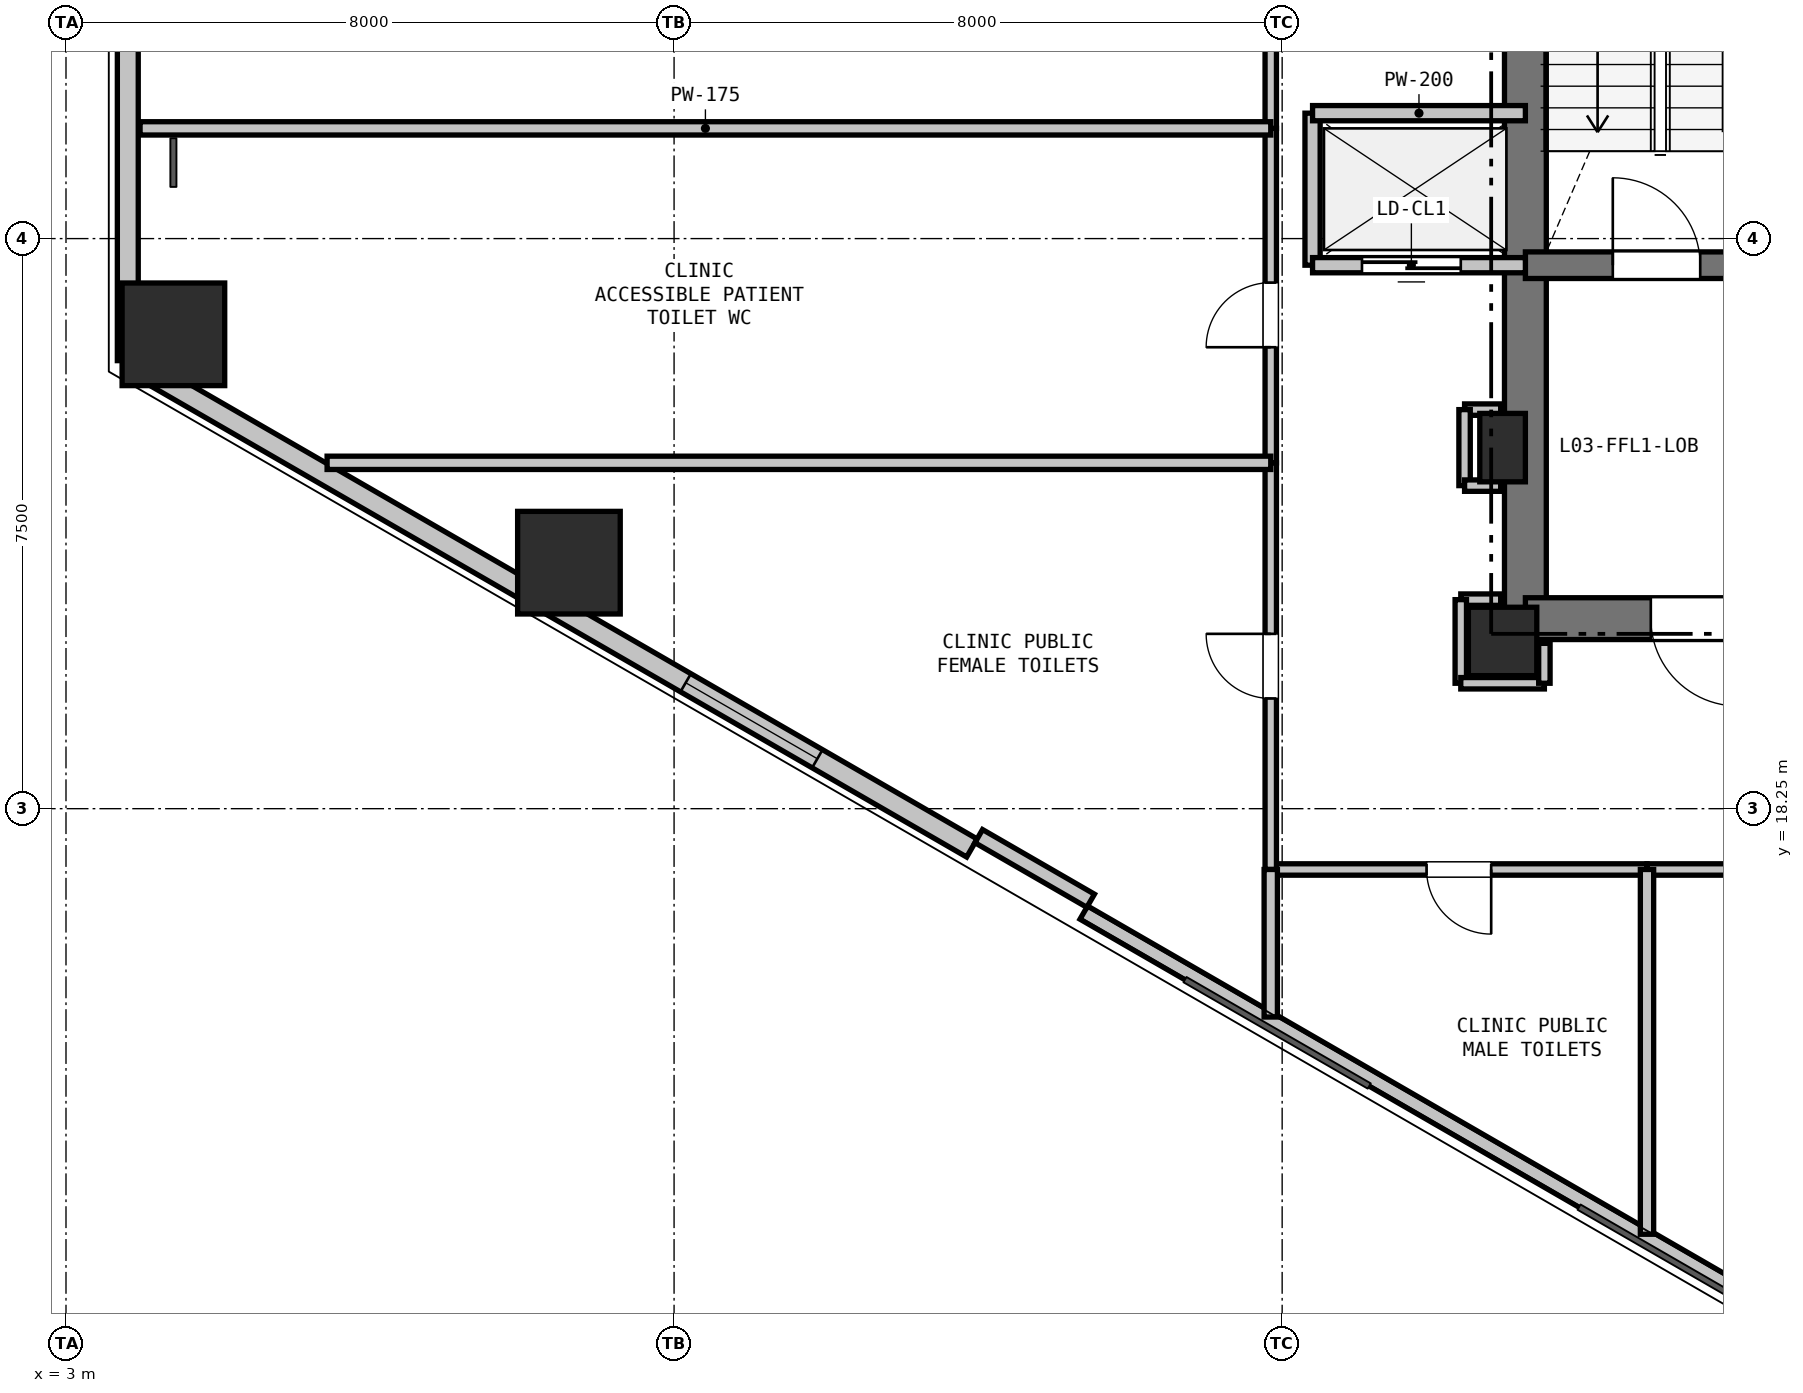
"""IFC4 building model, lengths in metres.
Left out: names, types, materials, properties, quantities, classifications, styles, units other than length and angle.
Written with IfcOpenShell. Run it as: python <this file> out.ifc"""

import sys

from ifc_helpers import new_model, si_unit, direction, frame, frame_2d, origin, origin_2d, place, context, subcontext, project, spatial, rectangle, hollow_rectangle, extrude, element, fill, save


model = new_model("IFC4")
c1 = context("Model", 3, precision=1e-05, world=origin(), true_north=direction((0.0, 1.0)))
c2 = subcontext(c1, "Body", "Model", "MODEL_VIEW")
j1 = project(units=[si_unit("LENGTHUNIT", "METRE"), si_unit("PLANEANGLEUNIT", "RADIAN")], contexts=[c1])
p1 = place(None, origin())
s1 = spatial("IfcSite", under=j1, at=p1, CompositionType="ELEMENT")
p2 = place(p1, origin())
s2 = spatial("IfcBuilding", under=s1, at=p2, CompositionType="ELEMENT")
p3 = place(p2, frame((0.0, 0.0, 14.4)))
s3 = spatial("IfcBuildingStorey", under=s2, at=p3, CompositionType="ELEMENT", Elevation=14.4)
p4 = place(p3, frame((21.9, 20.45, 0.0), z_axis=(0.0, 0.0, 1.0), x_axis=(1.0, 0.0, 0.0)))
e1 = element("IfcColumn", 1, at=p4, inside=s3, PredefinedType="COLUMN", context=c2, shape_type="SweptSolid", body=[
    extrude(rectangle(XDim=0.9, YDim=0.9, at=origin_2d()), origin(), (0.0, 0.0, 1.0), 4.8),
])
p5 = place(p3, frame((21.9, 23.0, 0.0), z_axis=(0.0, 0.0, 1.0), x_axis=(1.0, 0.0, 0.0)))
e2 = element("IfcColumn", 2, at=p5, inside=s3, PredefinedType="PILASTER", context=c2, shape_type="SweptSolid", body=[
    extrude(rectangle(XDim=0.6, YDim=0.9, at=origin_2d()), origin(), (0.0, 0.0, 1.0), 4.8),
])
for number, where, z_axis, x_axis in (
    (3, (9.617, 21.486, 0.0), (0.0, 0.0, 1.0), (1.0, 0.0, 0.0)),
    (4, (4.413, 24.491, 0.0), (0.0, 0.0, 1.0), (1.0, 0.0, 0.0)),
):
    element("IfcColumn", number, at=place(p3, frame(where, z_axis=z_axis, x_axis=x_axis)), inside=s3, PredefinedType="COLUMN", context=c2, shape_type="SweptSolid", body=[
        extrude(hollow_rectangle(XDim=1.35, YDim=1.35, WallThickness=0.036, at=origin_2d()), origin(), (0.0, 0.0, 1.0), 4.8),
    ])
p6 = place(p3, frame((3.813, 24.144, 0.0), z_axis=(0.0, 0.0, 1.0), x_axis=(0.0, 1.0, 0.0)))
e5 = element("IfcWall", 5, at=p6, inside=s3, PredefinedType="SOLIDWALL", context=c2, shape_type="SweptSolid", body=[
    extrude(rectangle(XDim=5.211, YDim=0.275, at=frame_2d((2.606, 0.0))), origin(), (0.0, 0.0, 1.0), 4.14),
])
p7 = place(p3, frame((26.76, 10.896, 0.0), z_axis=(0.0, 0.0, 1.0), x_axis=(-0.866027351828, 0.499996625875, 0.0)))
e6 = element("IfcWall", 6, at=p7, inside=s3, PredefinedType="PARAPET", context=c2, shape_type="SweptSolid", body=[
    extrude(rectangle(XDim=11.973, YDim=0.2, at=frame_2d((5.987, 0.0))), origin(), (0.0, 0.0, 1.0), 0.2),
])
p8 = place(p3, frame((14.918, 17.733, 0.0), z_axis=(0.0, 0.0, 1.0), x_axis=(-0.866027105532, 0.499997052475, 0.0)))
e7 = element("IfcWall", 7, at=p8, inside=s3, PredefinedType="SOLIDWALL", context=c2, shape_type="SweptSolid", body=[
    extrude(rectangle(XDim=12.673, YDim=0.275, at=frame_2d((6.336, 0.0))), origin(), (0.0, 0.0, 1.0), 4.14),
])
p9 = place(p8, frame((2.348, 0.0, 0.9)))
e8 = element("IfcOpeningElement", 8, at=p9, cuts=e7, PredefinedType="OPENING", context=c2, shape_type="SweptSolid", body=[
    extrude(rectangle(XDim=2.0, YDim=1.8, at=frame_2d((1.0, 0.9))), frame((0.0, 0.147, 0.0), z_axis=(0.0, -1.0, 0.0), x_axis=(1.0, 0.0, 0.0)), (0.0, 0.0, 1.0), 0.295),
])
p10 = place(p3, frame((16.48, 17.039, 0.0), z_axis=(0.0, 0.0, 1.0), x_axis=(-0.86605165483, 0.499954529098, 0.0)))
e9 = element("IfcWall", 9, at=p10, inside=s3, PredefinedType="PARAPET", context=c2, shape_type="SweptSolid", body=[
    extrude(rectangle(XDim=1.7, YDim=0.2, at=frame_2d((0.85, 0.0))), origin(), (0.0, 0.0, 1.0), 4.14),
])
p11 = place(p3, frame((22.2, 20.75, 0.0), z_axis=(0.0, 0.0, 1.0), x_axis=(0.0, 1.0, 0.0)))
e10 = element("IfcWall", 10, at=p11, inside=s3, PredefinedType="SHEAR", context=c2, shape_type="SweptSolid", body=[
    extrude(rectangle(XDim=4.65, YDim=0.55, at=frame_2d((2.325, 0.0))), origin(), (0.0, 0.0, 1.0), 4.52),
])
p12 = place(p3, frame((22.2, 25.4, 0.0), z_axis=(0.0, 0.0, 1.0), x_axis=(0.0, 1.0, 0.0)))
e11 = element("IfcWall", 11, at=p12, inside=s3, PredefinedType="SHEAR", context=c2, shape_type="SweptSolid", body=[
    extrude(rectangle(XDim=7.35, YDim=0.55, at=frame_2d((3.675, 0.0))), origin(), (0.0, 0.0, 1.0), 4.52),
])
p13 = place(p3, frame((25.65, 20.75, 0.0), z_axis=(0.0, 0.0, 1.0), x_axis=(-1.0, 0.0, 0.0)))
e12 = element("IfcWall", 12, at=p13, inside=s3, PredefinedType="SHEAR", context=c2, shape_type="SweptSolid", body=[
    extrude(rectangle(XDim=3.45, YDim=0.55, at=frame_2d((1.725, 0.0))), origin(), (0.0, 0.0, 1.0), 4.52),
])
p14 = place(p13, frame((0.65, 0.0, 0.0)))
e13 = element("IfcOpeningElement", 13, at=p14, cuts=e12, PredefinedType="OPENING", context=c2, shape_type="SweptSolid", body=[
    extrude(rectangle(XDim=1.15, YDim=2.15, at=frame_2d((0.575, 1.075))), frame((0.0, 0.285, 0.0), z_axis=(0.0, -1.0, 0.0), x_axis=(1.0, 0.0, 0.0)), (0.0, 0.0, 1.0), 0.57),
])
p15 = place(p3, frame((22.2, 25.4, 0.0), z_axis=(0.0, 0.0, 1.0), x_axis=(1.0, 0.0, 0.0)))
e14 = element("IfcWall", 14, at=p15, inside=s3, PredefinedType="SHEAR", context=c2, shape_type="SweptSolid", body=[
    extrude(rectangle(XDim=3.45, YDim=0.35, at=frame_2d((1.725, 0.0))), origin(), (0.0, 0.0, 1.0), 4.52),
])
p16 = place(p15, frame((1.15, 0.0, 0.0)))
e15 = element("IfcOpeningElement", 15, at=p16, cuts=e14, PredefinedType="OPENING", context=c2, shape_type="SweptSolid", body=[
    extrude(rectangle(XDim=1.15, YDim=2.15, at=frame_2d((0.575, 1.075))), frame((0.0, 0.185, 0.0), z_axis=(0.0, -1.0, 0.0), x_axis=(1.0, 0.0, 0.0)), (0.0, 0.0, 1.0), 0.37),
])
p17 = place(p3, frame((19.4, 25.4, 0.0), z_axis=(0.0, 0.0, 1.0), x_axis=(0.0, 1.0, 0.0)))
e16 = element("IfcWall", 16, at=p17, inside=s3, PredefinedType="PARTITIONING", context=c2, shape_type="SweptSolid", body=[
    extrude(rectangle(XDim=2.0, YDim=0.2, at=frame_2d((1.0, 0.0))), origin(), (0.0, 0.0, 1.0), 4.52),
])
p18 = place(p3, frame((19.4, 27.4, 0.0), z_axis=(0.0, 0.0, 1.0), x_axis=(1.0, 0.0, 0.0)))
e17 = element("IfcWall", 17, at=p18, inside=s3, PredefinedType="PARTITIONING", context=c2, shape_type="SweptSolid", body=[
    extrude(rectangle(XDim=2.8, YDim=0.2, at=frame_2d((1.4, 0.0))), origin(), (0.0, 0.0, 1.0), 3.969),
])
p19 = place(p3, frame((22.2, 25.4, 0.0), z_axis=(0.0, 0.0, 1.0), x_axis=(-1.0, 0.0, 0.0)))
e18 = element("IfcWall", 18, at=p19, inside=s3, PredefinedType="PARTITIONING", context=c2, shape_type="SweptSolid", body=[
    extrude(rectangle(XDim=2.8, YDim=0.2, at=frame_2d((1.4, 0.0))), origin(), (0.0, 0.0, 1.0), 3.969),
])
p20 = place(p19, frame((0.85, 0.0, 0.0)))
e19 = element("IfcOpeningElement", 19, at=p20, cuts=e18, PredefinedType="OPENING", context=c2, shape_type="SweptSolid", body=[
    extrude(rectangle(XDim=1.3, YDim=2.2, at=frame_2d((0.65, 1.1))), frame((0.0, 0.11, 0.0), z_axis=(0.0, -1.0, 0.0), x_axis=(1.0, 0.0, 0.0)), (0.0, 0.0, 1.0), 0.22),
])
p21 = place(p3, frame((21.875, 21.0, 0.0), z_axis=(0.0, 0.0, 1.0), x_axis=(-1.0, 0.0, 0.0)))
e20 = element("IfcWall", 20, at=p21, inside=s3, PredefinedType="PARTITIONING", context=c2, shape_type="SweptSolid", body=[
    extrude(rectangle(XDim=0.525, YDim=0.15, at=frame_2d((0.262, 0.0))), origin(), (0.0, 0.0, 1.0), 3.969),
])
p22 = place(p3, frame((21.35, 21.0, 0.0), z_axis=(0.0, 0.0, 1.0), x_axis=(0.0, -1.0, 0.0)))
e21 = element("IfcWall", 21, at=p22, inside=s3, PredefinedType="PARTITIONING", context=c2, shape_type="SweptSolid", body=[
    extrude(rectangle(XDim=1.1, YDim=0.15, at=frame_2d((0.55, 0.0))), origin(), (0.0, 0.0, 1.0), 3.818),
])
p23 = place(p3, frame((21.35, 19.9, 0.0), z_axis=(0.0, 0.0, 1.0), x_axis=(1.0, 0.0, 0.0)))
e22 = element("IfcWall", 22, at=p23, inside=s3, PredefinedType="PARTITIONING", context=c2, shape_type="SweptSolid", body=[
    extrude(rectangle(XDim=1.1, YDim=0.15, at=frame_2d((0.55, 0.0))), origin(), (0.0, 0.0, 1.0), 3.818),
])
p24 = place(p3, frame((22.45, 19.9, 0.0), z_axis=(0.0, 0.0, 1.0), x_axis=(0.0, 1.0, 0.0)))
e23 = element("IfcWall", 23, at=p24, inside=s3, PredefinedType="PARTITIONING", context=c2, shape_type="SweptSolid", body=[
    extrude(rectangle(XDim=0.525, YDim=0.15, at=frame_2d((0.263, 0.0))), origin(), (0.0, 0.0, 1.0), 3.818),
])
p25 = place(p3, frame((29.1, 17.45, 0.0), z_axis=(0.0, 0.0, 1.0), x_axis=(-1.0, 0.0, 0.0)))
e24 = element("IfcWall", 24, at=p25, inside=s3, PredefinedType="PARTITIONING", context=c2, shape_type="SweptSolid", body=[
    extrude(rectangle(XDim=5.3, YDim=0.15, at=frame_2d((2.65, 0.0))), origin(), (0.0, 0.0, 1.0), 3.818),
])
p26 = place(p25, frame((1.85, 0.0, 0.0)))
e25 = element("IfcOpeningElement", 25, at=p26, cuts=e24, PredefinedType="OPENING", context=c2, shape_type="SweptSolid", body=[
    extrude(rectangle(XDim=1.6, YDim=2.2, at=frame_2d((0.8, 1.1))), frame((0.0, 0.085, 0.0), z_axis=(0.0, -1.0, 0.0), x_axis=(1.0, 0.0, 0.0)), (0.0, 0.0, 1.0), 0.17),
])
p27 = place(p3, frame((23.8, 17.45, 0.0), z_axis=(0.0, 0.0, 1.0), x_axis=(-1.0, 0.0, 0.0)))
e26 = element("IfcWall", 26, at=p27, inside=s3, PredefinedType="PARTITIONING", context=c2, shape_type="SweptSolid", body=[
    extrude(rectangle(XDim=4.95, YDim=0.15, at=frame_2d((2.475, 0.0))), origin(), (0.0, 0.0, 1.0), 4.52),
])
p28 = place(p27, frame((2.05, 0.0, 0.0)))
e27 = element("IfcOpeningElement", 27, at=p28, cuts=e26, PredefinedType="OPENING", context=c2, shape_type="SweptSolid", body=[
    extrude(rectangle(XDim=0.85, YDim=2.1, at=frame_2d((0.425, 1.05))), frame((0.0, 0.085, 0.0), z_axis=(0.0, -1.0, 0.0), x_axis=(1.0, 0.0, 0.0)), (0.0, 0.0, 1.0), 0.17),
])
p29 = place(p3, frame((18.85, 17.45, 0.0), z_axis=(0.0, 0.0, 1.0), x_axis=(0.0, 1.0, 0.0)))
e28 = element("IfcWall", 28, at=p29, inside=s3, PredefinedType="PARTITIONING", context=c2, shape_type="SweptSolid", body=[
    extrude(rectangle(XDim=5.35, YDim=0.15, at=frame_2d((2.675, 0.0))), origin(), (0.0, 0.0, 1.0), 3.818),
])
p30 = place(p29, frame((2.25, 0.0, 0.0)))
e29 = element("IfcOpeningElement", 29, at=p30, cuts=e28, PredefinedType="OPENING", context=c2, shape_type="SweptSolid", body=[
    extrude(rectangle(XDim=0.85, YDim=2.1, at=frame_2d((0.425, 1.05))), frame((0.0, 0.085, 0.0), z_axis=(0.0, -1.0, 0.0), x_axis=(1.0, 0.0, 0.0)), (0.0, 0.0, 1.0), 0.17),
])
p31 = place(p3, frame((18.85, 22.8, 0.0), z_axis=(0.0, 0.0, 1.0), x_axis=(0.0, 1.0, 0.0)))
e30 = element("IfcWall", 30, at=p31, inside=s3, PredefinedType="PARTITIONING", context=c2, shape_type="SweptSolid", body=[
    extrude(rectangle(XDim=4.4, YDim=0.15, at=frame_2d((2.2, 0.0))), origin(), (0.0, 0.0, 1.0), 4.52),
])
p32 = place(p31, frame((1.521, 0.0, 0.0)))
e31 = element("IfcOpeningElement", 31, at=p32, cuts=e30, PredefinedType="OPENING", context=c2, shape_type="SweptSolid", body=[
    extrude(rectangle(XDim=0.85, YDim=2.1, at=frame_2d((0.425, 1.05))), frame((0.0, 0.085, 0.0), z_axis=(0.0, -1.0, 0.0), x_axis=(1.0, 0.0, 0.0)), (0.0, 0.0, 1.0), 0.17),
])
p33 = place(p3, frame((18.85, 27.2, 0.0), z_axis=(0.0, 0.0, 1.0), x_axis=(0.0, 1.0, 0.0)))
e32 = element("IfcWall", 32, at=p33, inside=s3, PredefinedType="PARTITIONING", context=c2, shape_type="SweptSolid", body=[
    extrude(rectangle(XDim=8.85, YDim=0.15, at=frame_2d((4.425, 0.0))), origin(), (0.0, 0.0, 1.0), 3.818),
])
p34 = place(p33, frame((3.925, 0.0, 0.0)))
e33 = element("IfcOpeningElement", 33, at=p34, cuts=e32, PredefinedType="OPENING", context=c2, shape_type="SweptSolid", body=[
    extrude(rectangle(XDim=1.0, YDim=2.15, at=frame_2d((0.5, 1.075))), frame((0.0, 0.085, 0.0), z_axis=(0.0, -1.0, 0.0), x_axis=(1.0, 0.0, 0.0)), (0.0, 0.0, 1.0), 0.17),
])
p35 = place(p3, frame((21.875, 23.5, 0.0), z_axis=(0.0, 0.0, 1.0), x_axis=(-1.0, 0.0, 0.0)))
e34 = element("IfcWall", 34, at=p35, inside=s3, PredefinedType="PARTITIONING", context=c2, shape_type="SweptSolid", body=[
    extrude(rectangle(XDim=0.475, YDim=0.15, at=frame_2d((0.238, 0.0))), origin(), (0.0, 0.0, 1.0), 3.969),
])
p36 = place(p3, frame((21.4, 23.5, 0.0), z_axis=(0.0, 0.0, 1.0), x_axis=(0.0, -1.0, 0.0)))
e35 = element("IfcWall", 35, at=p36, inside=s3, PredefinedType="PARTITIONING", context=c2, shape_type="SweptSolid", body=[
    extrude(rectangle(XDim=1.0, YDim=0.15, at=frame_2d((0.5, 0.0))), origin(), (0.0, 0.0, 1.0), 4.52),
])
p37 = place(p3, frame((21.4, 22.5, 0.0), z_axis=(0.0, 0.0, 1.0), x_axis=(1.0, 0.0, 0.0)))
e36 = element("IfcWall", 36, at=p37, inside=s3, PredefinedType="PARTITIONING", context=c2, shape_type="SweptSolid", body=[
    extrude(rectangle(XDim=0.475, YDim=0.15, at=frame_2d((0.238, 0.0))), origin(), (0.0, 0.0, 1.0), 3.969),
])
p38 = place(p3, frame((23.8, 17.45, 0.0), z_axis=(0.0, 0.0, 1.0), x_axis=(0.0, -1.0, 0.0)))
e37 = element("IfcWall", 37, at=p38, inside=s3, PredefinedType="PLUMBINGWALL", context=c2, shape_type="SweptSolid", body=[
    extrude(rectangle(XDim=4.799, YDim=0.175, at=frame_2d((2.399, 0.0))), origin(), (0.0, 0.0, 1.0), 4.131),
])
p39 = place(p3, frame((18.85, 15.509, 0.0), z_axis=(0.0, 0.0, 1.0), x_axis=(0.0, 1.0, 0.0)))
e38 = element("IfcWall", 38, at=p39, inside=s3, PredefinedType="PLUMBINGWALL", context=c2, shape_type="SweptSolid", body=[
    extrude(rectangle(XDim=1.941, YDim=0.175, at=frame_2d((0.97, 0.0))), origin(), (0.0, 0.0, 1.0), 4.131),
])
p40 = place(p3, frame((6.435, 22.8, 0.0), z_axis=(0.0, 0.0, 1.0), x_axis=(1.0, 0.0, 0.0)))
e39 = element("IfcWall", 39, at=p40, inside=s3, PredefinedType="PLUMBINGWALL", context=c2, shape_type="SweptSolid", body=[
    extrude(rectangle(XDim=12.415, YDim=0.175, at=frame_2d((6.208, 0.0))), origin(), (0.0, 0.0, 1.0), 3.818),
])
p41 = place(p3, frame((3.975, 27.2, 0.0), z_axis=(0.0, 0.0, 1.0), x_axis=(1.0, 0.0, 0.0)))
e40 = element("IfcWall", 40, at=p41, inside=s3, PredefinedType="PLUMBINGWALL", context=c2, shape_type="SweptSolid", body=[
    extrude(rectangle(XDim=14.875, YDim=0.175, at=frame_2d((7.438, 0.0))), origin(), (0.0, 0.0, 1.0), 4.131),
])
p42 = place(p9, origin())
e41 = element("IfcWindow", 41, at=p42, inside=s3, PartitioningType="SINGLE_PANEL", PredefinedType="WINDOW", context=c2, shape_type="SweptSolid", body=[
    extrude(rectangle(XDim=2.0, YDim=1.8, at=frame_2d((1.0, 0.9))), frame((0.0, 0.03, 0.0), z_axis=(0.0, -1.0, 0.0), x_axis=(1.0, 0.0, 0.0)), (0.0, 0.0, 1.0), 0.06),
])
fill(e8, e41)
p43 = place(p20, origin())
e42 = element("IfcDoor", 42, at=p43, inside=s3, OperationType="SLIDING_TO_LEFT", PredefinedType="DOOR", context=c2, shape_type="SweptSolid", body=[
    extrude(rectangle(XDim=1.3, YDim=2.2, at=frame_2d((0.65, 1.1))), frame((0.0, 0.025, 0.0), z_axis=(0.0, -1.0, 0.0), x_axis=(1.0, 0.0, 0.0)), (0.0, 0.0, 1.0), 0.05),
])
fill(e19, e42)
p44 = place(p16, origin())
e43 = element("IfcDoor", 43, at=p44, inside=s3, OperationType="SINGLE_SWING_LEFT", PredefinedType="DOOR", context=c2, shape_type="SweptSolid", body=[
    extrude(rectangle(XDim=1.15, YDim=2.15, at=frame_2d((0.575, 1.075))), frame((0.0, 0.025, 0.0), z_axis=(0.0, -1.0, 0.0), x_axis=(1.0, 0.0, 0.0)), (0.0, 0.0, 1.0), 0.05),
])
fill(e15, e43)
p45 = place(p14, origin())
e44 = element("IfcDoor", 44, at=p45, inside=s3, OperationType="SINGLE_SWING_LEFT", PredefinedType="DOOR", context=c2, shape_type="SweptSolid", body=[
    extrude(rectangle(XDim=1.15, YDim=2.15, at=frame_2d((0.575, 1.075))), frame((0.0, 0.025, 0.0), z_axis=(0.0, -1.0, 0.0), x_axis=(1.0, 0.0, 0.0)), (0.0, 0.0, 1.0), 0.05),
])
fill(e13, e44)
p46 = place(p28, origin())
e45 = element("IfcDoor", 45, at=p46, inside=s3, OperationType="SINGLE_SWING_LEFT", PredefinedType="DOOR", context=c2, shape_type="SweptSolid", body=[
    extrude(rectangle(XDim=0.85, YDim=2.1, at=frame_2d((0.425, 1.05))), frame((0.0, 0.025, 0.0), z_axis=(0.0, -1.0, 0.0), x_axis=(1.0, 0.0, 0.0)), (0.0, 0.0, 1.0), 0.05),
])
fill(e27, e45)
p47 = place(p30, origin())
e46 = element("IfcDoor", 46, at=p47, inside=s3, OperationType="SINGLE_SWING_RIGHT", PredefinedType="DOOR", context=c2, shape_type="SweptSolid", body=[
    extrude(rectangle(XDim=0.85, YDim=2.1, at=frame_2d((0.425, 1.05))), frame((0.0, 0.025, 0.0), z_axis=(0.0, -1.0, 0.0), x_axis=(1.0, 0.0, 0.0)), (0.0, 0.0, 1.0), 0.05),
])
fill(e29, e46)
p48 = place(p32, origin())
e47 = element("IfcDoor", 47, at=p48, inside=s3, OperationType="SINGLE_SWING_LEFT", PredefinedType="DOOR", context=c2, shape_type="SweptSolid", body=[
    extrude(rectangle(XDim=0.85, YDim=2.1, at=frame_2d((0.425, 1.05))), frame((0.0, 0.025, 0.0), z_axis=(0.0, -1.0, 0.0), x_axis=(1.0, 0.0, 0.0)), (0.0, 0.0, 1.0), 0.05),
])
fill(e31, e47)
save(model, sys.argv[1])
